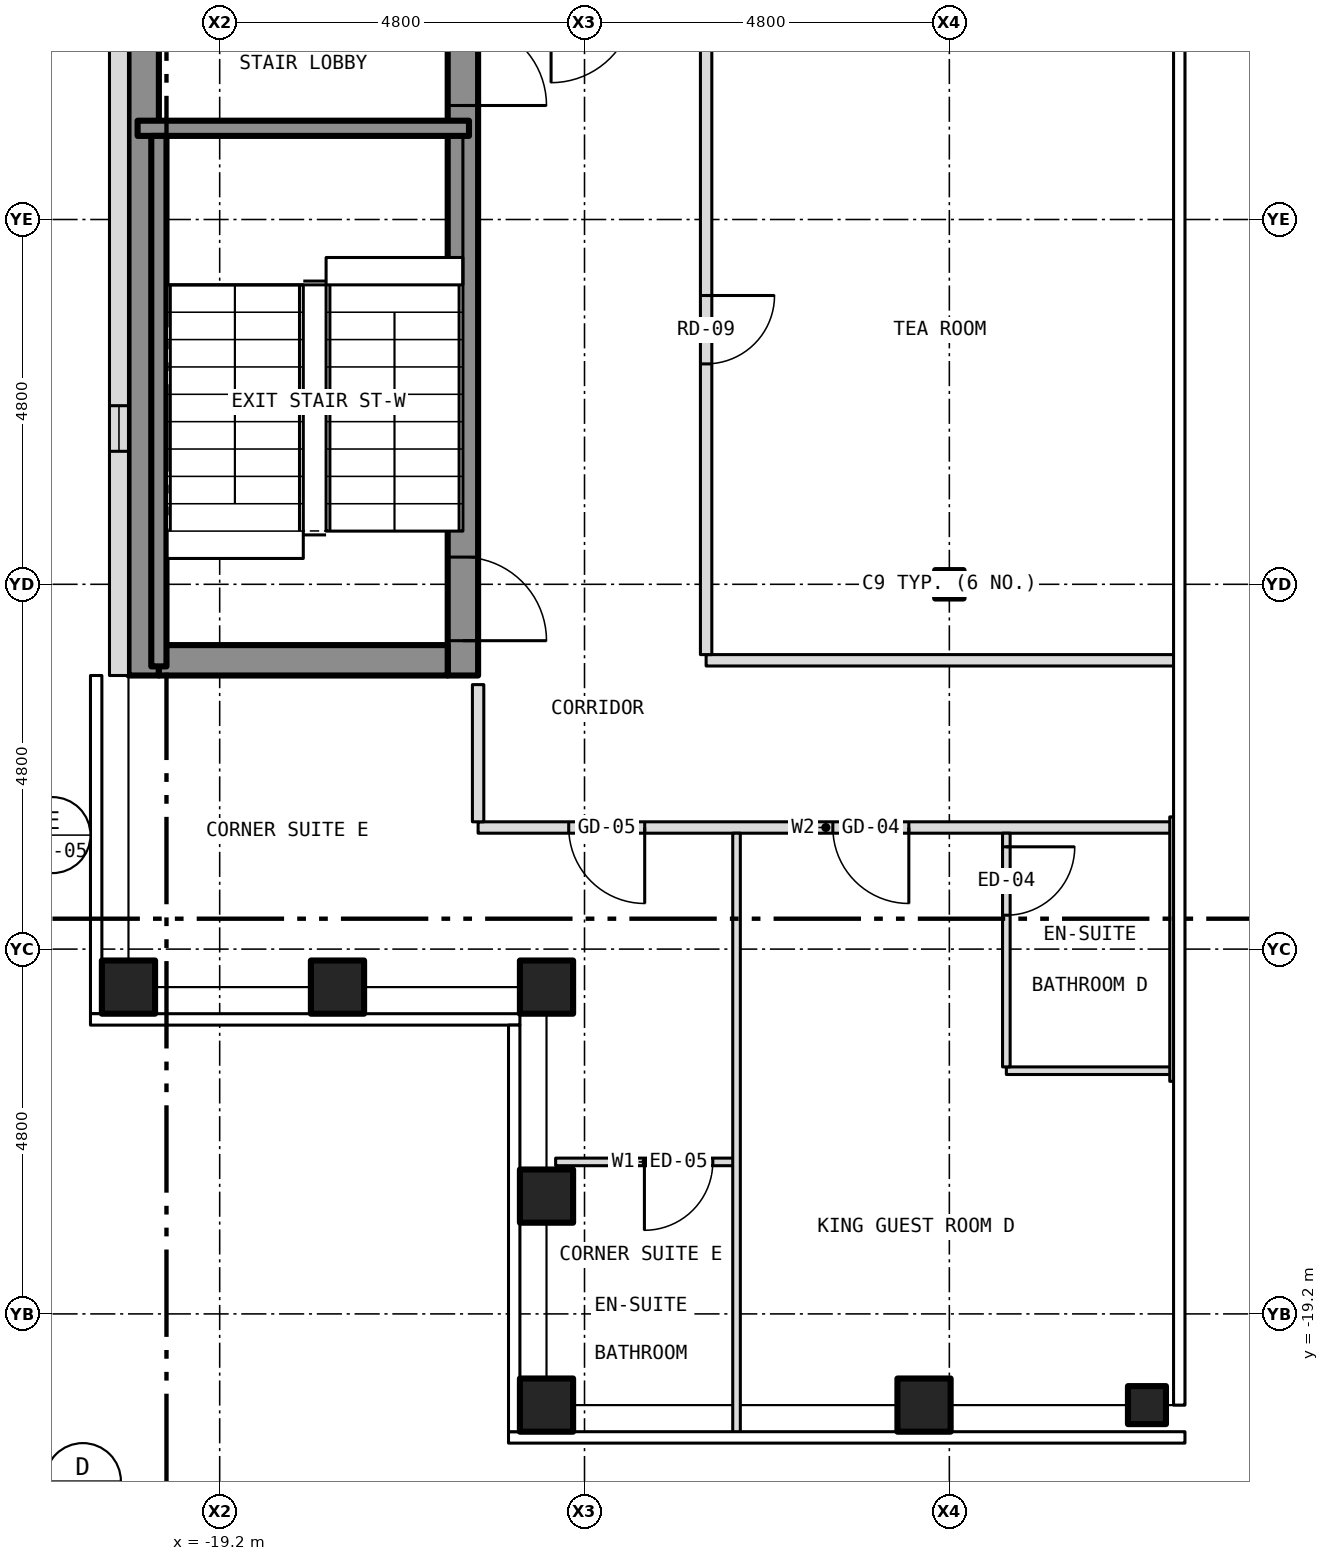
"""IFC4 building model, lengths in metres.
Left out: names, types, materials, properties, quantities, classifications, styles, units other than length and angle.
Written with IfcOpenShell. Run it as: python <this file> out.ifc"""

import sys

from ifc_helpers import new_model, si_unit, direction, frame, frame_2d, origin, origin_2d, place, context, subcontext, project, spatial, rectangle, hollow_rectangle, i_section, extrude, element, fill, save


model = new_model("IFC4")
c1 = context("Model", 3, precision=1e-05, world=origin(), true_north=direction((0.0, 1.0)))
c2 = subcontext(c1, "Body", "Model", "MODEL_VIEW")
j1 = project(units=[si_unit("LENGTHUNIT", "METRE"), si_unit("PLANEANGLEUNIT", "RADIAN")], contexts=[c1])
p1 = place(None, origin())
s1 = spatial("IfcSite", under=j1, at=p1, CompositionType="ELEMENT")
p2 = place(p1, origin())
s2 = spatial("IfcBuilding", under=s1, at=p2, CompositionType="ELEMENT")
p3 = place(p2, frame((0.0, 0.0, 222.5)))
s3 = spatial("IfcBuildingStorey", under=s2, at=p3, CompositionType="ELEMENT", Elevation=222.5)
for number, where, z_axis, x_axis in (
    (1, (-14.9, -20.4, -0.15), (0.0, 0.0, 1.0), (1.0, 0.0, 0.0)),
    (2, (-9.933, -20.4, -0.15), (0.0, 0.0, 1.0), (1.0, 0.0, 0.0)),
    (3, (-20.4, -14.9, -0.15), (0.0, 0.0, 1.0), (1.0, 0.0, 0.0)),
    (4, (-14.9, -14.9, -0.15), (0.0, 0.0, 1.0), (1.0, 0.0, 0.0)),
    (5, (-14.9, -17.65, -0.15), (0.0, 0.0, 1.0), (1.0, 0.0, 0.0)),
    (6, (-17.65, -14.9, -0.15), (0.0, 0.0, 1.0), (1.0, 0.0, 0.0)),
):
    element("IfcColumn", number, at=place(p3, frame(where, z_axis=z_axis, x_axis=x_axis)), inside=s3, PredefinedType="COLUMN", context=c2, shape_type="SweptSolid", body=[
        extrude(hollow_rectangle(XDim=0.7, YDim=0.7, WallThickness=0.04, at=origin_2d()), origin(), (0.0, 0.0, 1.0), 3.5),
    ])
p4 = place(p3, frame((-7.0, -20.4, -0.15), z_axis=(0.0, 0.0, 1.0), x_axis=(1.0, 0.0, 0.0)))
e7 = element("IfcColumn", 7, at=p4, inside=s3, PredefinedType="COLUMN", context=c2, shape_type="SweptSolid", body=[
    extrude(hollow_rectangle(XDim=0.5, YDim=0.5, WallThickness=0.03, at=origin_2d()), origin(), (0.0, 0.0, 1.0), 3.5),
])
p5 = place(p3, frame((-9.6, -9.6, -0.15), z_axis=(0.0, 0.0, 1.0), x_axis=(1.0, 0.0, 0.0)))
e8 = element("IfcColumn", 8, at=p5, inside=s3, PredefinedType="COLUMN", context=c2, shape_type="SweptSolid", body=[
    extrude(i_section(OverallWidth=0.373, OverallDepth=0.373, WebThickness=0.016, FlangeThickness=0.026, at=origin_2d()), origin(), (0.0, 0.0, 1.0), 3.5),
])
p6 = place(p3, frame((-16.0, -10.8, 0.0), z_axis=(0.0, 0.0, 1.0), x_axis=(0.0, 1.0, 0.0)))
e9 = element("IfcWall", 9, at=p6, inside=s3, PredefinedType="SHEAR", context=c2, shape_type="SweptSolid", body=[
    extrude(rectangle(XDim=21.6, YDim=0.4, at=frame_2d((10.8, 0.0))), origin(), (0.0, 0.0, 1.0), 3.25),
])
p7 = place(p6, frame((9.4, 0.0, 0.0)))
e10 = element("IfcOpeningElement", 10, at=p7, cuts=e9, PredefinedType="OPENING", context=c2, shape_type="SweptSolid", body=[
    extrude(rectangle(XDim=1.1, YDim=2.1, at=frame_2d((0.55, 1.05))), frame((0.0, 0.212, 0.0), z_axis=(0.0, -1.0, 0.0), x_axis=(1.0, 0.0, 0.0)), (0.0, 0.0, 1.0), 0.424),
])
p8 = place(p6, frame((11.5, 0.0, 0.0)))
e11 = element("IfcOpeningElement", 11, at=p8, cuts=e9, PredefinedType="OPENING", context=c2, shape_type="SweptSolid", body=[
    extrude(rectangle(XDim=1.1, YDim=2.1, at=frame_2d((0.55, 1.05))), frame((0.0, 0.212, 0.0), z_axis=(0.0, -1.0, 0.0), x_axis=(1.0, 0.0, 0.0)), (0.0, 0.0, 1.0), 0.424),
])
p9 = place(p6, frame((13.6, 0.0, 0.0)))
e12 = element("IfcOpeningElement", 12, at=p9, cuts=e9, PredefinedType="OPENING", context=c2, shape_type="SweptSolid", body=[
    extrude(rectangle(XDim=1.1, YDim=2.1, at=frame_2d((0.55, 1.05))), frame((0.0, 0.212, 0.0), z_axis=(0.0, -1.0, 0.0), x_axis=(1.0, 0.0, 0.0)), (0.0, 0.0, 1.0), 0.424),
])
p10 = place(p6, frame((15.7, 0.0, 0.0)))
e13 = element("IfcOpeningElement", 13, at=p10, cuts=e9, PredefinedType="OPENING", context=c2, shape_type="SweptSolid", body=[
    extrude(rectangle(XDim=1.1, YDim=2.1, at=frame_2d((0.55, 1.05))), frame((0.0, 0.212, 0.0), z_axis=(0.0, -1.0, 0.0), x_axis=(1.0, 0.0, 0.0)), (0.0, 0.0, 1.0), 0.424),
])
p11 = place(p6, frame((17.8, 0.0, 0.0)))
e14 = element("IfcOpeningElement", 14, at=p11, cuts=e9, PredefinedType="OPENING", context=c2, shape_type="SweptSolid", body=[
    extrude(rectangle(XDim=1.1, YDim=2.1, at=frame_2d((0.55, 1.05))), frame((0.0, 0.212, 0.0), z_axis=(0.0, -1.0, 0.0), x_axis=(1.0, 0.0, 0.0)), (0.0, 0.0, 1.0), 0.424),
])
p12 = place(p6, frame((0.458, 0.0, 0.0)))
e15 = element("IfcOpeningElement", 15, at=p12, cuts=e9, PredefinedType="OPENING", context=c2, shape_type="SweptSolid", body=[
    extrude(rectangle(XDim=1.1, YDim=2.1, at=frame_2d((0.55, 1.05))), frame((0.0, 0.212, 0.0), z_axis=(0.0, -1.0, 0.0), x_axis=(1.0, 0.0, 0.0)), (0.0, 0.0, 1.0), 0.424),
])
p13 = place(p6, frame((7.5, 0.0, 0.0)))
e16 = element("IfcOpeningElement", 16, at=p13, cuts=e9, PredefinedType="OPENING", context=c2, shape_type="SweptSolid", body=[
    extrude(rectangle(XDim=1.1, YDim=2.1, at=frame_2d((0.55, 1.05))), frame((0.0, 0.212, 0.0), z_axis=(0.0, -1.0, 0.0), x_axis=(1.0, 0.0, 0.0)), (0.0, 0.0, 1.0), 0.424),
])
p14 = place(p6, frame((20.0, 0.0, 0.0)))
e17 = element("IfcOpeningElement", 17, at=p14, cuts=e9, PredefinedType="OPENING", context=c2, shape_type="SweptSolid", body=[
    extrude(rectangle(XDim=0.9, YDim=2.1, at=frame_2d((0.45, 1.05))), frame((0.0, 0.212, 0.0), z_axis=(0.0, -1.0, 0.0), x_axis=(1.0, 0.0, 0.0)), (0.0, 0.0, 1.0), 0.424),
])
p15 = place(p3, frame((-20.2, -10.8, 0.0), z_axis=(0.0, 0.0, 1.0), x_axis=(0.0, 1.0, 0.0)))
e18 = element("IfcWall", 18, at=p15, inside=s3, PredefinedType="SHEAR", context=c2, shape_type="SweptSolid", body=[
    extrude(rectangle(XDim=21.6, YDim=0.4, at=frame_2d((10.8, 0.0))), origin(), (0.0, 0.0, 1.0), 3.25),
])
p16 = place(p3, frame((-20.0, -10.6, 0.0), z_axis=(0.0, 0.0, 1.0), x_axis=(1.0, 0.0, 0.0)))
e19 = element("IfcWall", 19, at=p16, inside=s3, PredefinedType="SHEAR", context=c2, shape_type="SweptSolid", body=[
    extrude(rectangle(XDim=3.8, YDim=0.4, at=frame_2d((1.9, 0.0))), origin(), (0.0, 0.0, 1.0), 3.25),
])
p17 = place(p3, frame((-20.525, 10.8, 0.0), z_axis=(0.0, 0.0, 1.0), x_axis=(0.0, -1.0, 0.0)))
e20 = element("IfcWall", 20, at=p17, inside=s3, PredefinedType="SOLIDWALL", context=c2, shape_type="SweptSolid", body=[
    extrude(rectangle(XDim=21.6, YDim=0.25, at=frame_2d((10.8, 0.0))), origin(), (0.0, 0.0, 1.0), 3.5),
])
p18 = place(p17, frame((18.05, 0.0, 1.0)))
e21 = element("IfcOpeningElement", 21, at=p18, cuts=e20, PredefinedType="OPENING", context=c2, shape_type="SweptSolid", body=[
    extrude(rectangle(XDim=0.6, YDim=1.5, at=frame_2d((0.3, 0.75))), frame((0.0, 0.137, 0.0), z_axis=(0.0, -1.0, 0.0), x_axis=(1.0, 0.0, 0.0)), (0.0, 0.0, 1.0), 0.274),
])
p19 = place(p3, frame((-14.78, -17.2, 0.0), z_axis=(0.0, 0.0, 1.0), x_axis=(1.0, 0.0, 0.0)))
e22 = element("IfcWall", 22, at=p19, inside=s3, PredefinedType="PARTITIONING", context=c2, shape_type="SweptSolid", body=[
    extrude(rectangle(XDim=2.38, YDim=0.1, at=frame_2d((1.19, 0.0))), origin(), (0.0, 0.0, 1.0), 3.35),
])
p20 = place(p19, frame((1.168, 0.0, 0.0)))
e23 = element("IfcOpeningElement", 23, at=p20, cuts=e22, PredefinedType="OPENING", context=c2, shape_type="SweptSolid", body=[
    extrude(rectangle(XDim=0.9, YDim=2.1, at=frame_2d((0.45, 1.05))), frame((0.0, 0.062, 0.0), z_axis=(0.0, -1.0, 0.0), x_axis=(1.0, 0.0, 0.0)), (0.0, 0.0, 1.0), 0.124),
])
p21 = place(p3, frame((-8.85, -16.0, 0.0), z_axis=(0.0, 0.0, 1.0), x_axis=(1.0, 0.0, 0.0)))
e24 = element("IfcWall", 24, at=p21, inside=s3, PredefinedType="PARTITIONING", context=c2, shape_type="SweptSolid", body=[
    extrude(rectangle(XDim=2.2, YDim=0.1, at=frame_2d((1.1, 0.0))), origin(), (0.0, 0.0, 1.0), 3.35),
])
p22 = place(p3, frame((-15.8, -12.8, 0.0), z_axis=(0.0, 0.0, 1.0), x_axis=(1.0, 0.0, 0.0)))
e25 = element("IfcWall", 25, at=p22, inside=s3, PredefinedType="PARTITIONING", context=c2, shape_type="SweptSolid", body=[
    extrude(rectangle(XDim=9.15, YDim=0.15, at=frame_2d((4.575, 0.0))), origin(), (0.0, 0.0, 1.0), 3.35),
])
p23 = place(p22, frame((4.667, 0.0, 0.0)))
e26 = element("IfcOpeningElement", 26, at=p23, cuts=e25, PredefinedType="OPENING", context=c2, shape_type="SweptSolid", body=[
    extrude(rectangle(XDim=1.0, YDim=2.1, at=frame_2d((0.5, 1.05))), frame((0.0, 0.087, 0.0), z_axis=(0.0, -1.0, 0.0), x_axis=(1.0, 0.0, 0.0)), (0.0, 0.0, 1.0), 0.174),
])
p24 = place(p22, frame((1.192, 0.0, 0.0)))
e27 = element("IfcOpeningElement", 27, at=p24, cuts=e25, PredefinedType="OPENING", context=c2, shape_type="SweptSolid", body=[
    extrude(rectangle(XDim=1.0, YDim=2.1, at=frame_2d((0.5, 1.05))), frame((0.0, 0.087, 0.0), z_axis=(0.0, -1.0, 0.0), x_axis=(1.0, 0.0, 0.0)), (0.0, 0.0, 1.0), 0.174),
])
p25 = place(p3, frame((-12.8, -10.6, 0.0), z_axis=(0.0, 0.0, 1.0), x_axis=(1.0, 0.0, 0.0)))
e28 = element("IfcWall", 28, at=p25, inside=s3, PredefinedType="PARTITIONING", context=c2, shape_type="SweptSolid", body=[
    extrude(rectangle(XDim=6.18, YDim=0.15, at=frame_2d((3.09, 0.0))), origin(), (0.0, 0.0, 1.0), 3.35),
])
p26 = place(p3, frame((-20.28, -3.6, 0.0), z_axis=(0.0, 0.0, 1.0), x_axis=(1.0, 0.0, 0.0)))
e29 = element("IfcWall", 29, at=p26, inside=s3, PredefinedType="SHEAR", context=c2, shape_type="SweptSolid", body=[
    extrude(rectangle(XDim=4.36, YDim=0.2, at=frame_2d((2.18, 0.0))), origin(), (0.0, 0.0, 1.0), 3.25),
])
p27 = place(p3, frame((-20.0, -10.68, 0.0), z_axis=(0.0, 0.0, 1.0), x_axis=(0.0, 1.0, 0.0)))
e30 = element("IfcWall", 30, at=p27, inside=s3, PredefinedType="SHEAR", context=c2, shape_type="SweptSolid", body=[
    extrude(rectangle(XDim=6.98, YDim=0.2, at=frame_2d((3.49, 0.0))), origin(), (0.0, 0.0, 1.0), 3.25),
])
p28 = place(p3, frame((-15.8, -12.725, 0.0), z_axis=(0.0, 0.0, 1.0), x_axis=(0.0, 1.0, 0.0)))
e31 = element("IfcWall", 31, at=p28, inside=s3, PredefinedType="PARTITIONING", context=c2, shape_type="SweptSolid", body=[
    extrude(rectangle(XDim=1.805, YDim=0.15, at=frame_2d((0.903, 0.0))), origin(), (0.0, 0.0, 1.0), 3.35),
])
p29 = place(p3, frame((-12.8, -10.525, 0.0), z_axis=(0.0, 0.0, 1.0), x_axis=(0.0, 1.0, 0.0)))
e32 = element("IfcWall", 32, at=p29, inside=s3, PredefinedType="PARTITIONING", context=c2, shape_type="SweptSolid", body=[
    extrude(rectangle(XDim=8.525, YDim=0.15, at=frame_2d((4.262, 0.0))), origin(), (0.0, 0.0, 1.0), 3.35),
])
p30 = place(p29, frame((3.825, 0.0, 0.0)))
e33 = element("IfcOpeningElement", 33, at=p30, cuts=e32, PredefinedType="OPENING", context=c2, shape_type="SweptSolid", body=[
    extrude(rectangle(XDim=0.9, YDim=2.1, at=frame_2d((0.45, 1.05))), frame((0.0, 0.087, 0.0), z_axis=(0.0, -1.0, 0.0), x_axis=(1.0, 0.0, 0.0)), (0.0, 0.0, 1.0), 0.174),
])
p31 = place(p3, frame((-12.4, -20.78, 0.0), z_axis=(0.0, 0.0, 1.0), x_axis=(0.0, 1.0, 0.0)))
e34 = element("IfcWall", 34, at=p31, inside=s3, PredefinedType="PARTITIONING", context=c2, shape_type="SweptSolid", body=[
    extrude(rectangle(XDim=7.905, YDim=0.1, at=frame_2d((3.953, 0.0))), origin(), (0.0, 0.0, 1.0), 3.35),
])
p32 = place(p3, frame((-8.85, -15.95, 0.0), z_axis=(0.0, 0.0, 1.0), x_axis=(0.0, 1.0, 0.0)))
e35 = element("IfcWall", 35, at=p32, inside=s3, PredefinedType="PARTITIONING", context=c2, shape_type="SweptSolid", body=[
    extrude(rectangle(XDim=3.075, YDim=0.1, at=frame_2d((1.538, 0.0))), origin(), (0.0, 0.0, 1.0), 3.35),
])
p33 = place(p32, frame((1.996, 0.0, 0.0)))
e36 = element("IfcOpeningElement", 36, at=p33, cuts=e35, PredefinedType="OPENING", context=c2, shape_type="SweptSolid", body=[
    extrude(rectangle(XDim=0.9, YDim=2.1, at=frame_2d((0.45, 1.05))), frame((0.0, 0.062, 0.0), z_axis=(0.0, -1.0, 0.0), x_axis=(1.0, 0.0, 0.0)), (0.0, 0.0, 1.0), 0.124),
])
p34 = place(p3, frame((-6.65, -16.14, 0.0), z_axis=(0.0, 0.0, 1.0), x_axis=(0.0, 1.0, 0.0)))
e37 = element("IfcWall", 37, at=p34, inside=s3, PredefinedType="PARTITIONING", context=c2, shape_type="SweptSolid", body=[
    extrude(rectangle(XDim=3.48, YDim=0.1, at=frame_2d((1.74, 0.0))), origin(), (0.0, 0.0, 1.0), 3.35),
])
p35 = place(p18, origin())
e38 = element("IfcWindow", 38, at=p35, inside=s3, PartitioningType="SINGLE_PANEL", PredefinedType="WINDOW", context=c2, shape_type="SweptSolid", body=[
    extrude(rectangle(XDim=0.6, YDim=1.5, at=frame_2d((0.3, 0.75))), frame((0.0, -0.035, 0.0), z_axis=(0.0, -1.0, 0.0), x_axis=(1.0, 0.0, 0.0)), (0.0, 0.0, 1.0), 0.06),
])
fill(e21, e38)
p36 = place(p12, origin())
e39 = element("IfcDoor", 39, at=p36, inside=s3, OperationType="SINGLE_SWING_LEFT", PredefinedType="DOOR", context=c2, shape_type="SweptSolid", body=[
    extrude(rectangle(XDim=1.1, YDim=2.1, at=frame_2d((0.55, 1.05))), frame((0.0, 0.025, 0.0), z_axis=(0.0, -1.0, 0.0), x_axis=(1.0, 0.0, 0.0)), (0.0, 0.0, 1.0), 0.05),
])
fill(e15, e39)
p37 = place(p13, origin())
e40 = element("IfcDoor", 40, at=p37, inside=s3, OperationType="SINGLE_SWING_LEFT", PredefinedType="DOOR", context=c2, shape_type="SweptSolid", body=[
    extrude(rectangle(XDim=1.1, YDim=2.1, at=frame_2d((0.55, 1.05))), frame((0.0, 0.025, 0.0), z_axis=(0.0, -1.0, 0.0), x_axis=(1.0, 0.0, 0.0)), (0.0, 0.0, 1.0), 0.05),
])
fill(e16, e40)
p38 = place(p23, origin())
e41 = element("IfcDoor", 41, at=p38, inside=s3, OperationType="SINGLE_SWING_RIGHT", PredefinedType="DOOR", context=c2, shape_type="SweptSolid", body=[
    extrude(rectangle(XDim=1.0, YDim=2.1, at=frame_2d((0.5, 1.05))), frame((0.0, 0.025, 0.0), z_axis=(0.0, -1.0, 0.0), x_axis=(1.0, 0.0, 0.0)), (0.0, 0.0, 1.0), 0.05),
])
fill(e26, e41)
p39 = place(p33, origin())
e42 = element("IfcDoor", 42, at=p39, inside=s3, OperationType="SINGLE_SWING_RIGHT", PredefinedType="DOOR", context=c2, shape_type="SweptSolid", body=[
    extrude(rectangle(XDim=0.9, YDim=2.1, at=frame_2d((0.45, 1.05))), frame((0.0, 0.025, 0.0), z_axis=(0.0, -1.0, 0.0), x_axis=(1.0, 0.0, 0.0)), (0.0, 0.0, 1.0), 0.05),
])
fill(e36, e42)
p40 = place(p20, origin())
e43 = element("IfcDoor", 43, at=p40, inside=s3, OperationType="SINGLE_SWING_LEFT", PredefinedType="DOOR", context=c2, shape_type="SweptSolid", body=[
    extrude(rectangle(XDim=0.9, YDim=2.1, at=frame_2d((0.45, 1.05))), frame((0.0, 0.025, 0.0), z_axis=(0.0, -1.0, 0.0), x_axis=(1.0, 0.0, 0.0)), (0.0, 0.0, 1.0), 0.05),
])
fill(e23, e43)
p41 = place(p24, origin())
e44 = element("IfcDoor", 44, at=p41, inside=s3, OperationType="SINGLE_SWING_RIGHT", PredefinedType="DOOR", context=c2, shape_type="SweptSolid", body=[
    extrude(rectangle(XDim=1.0, YDim=2.1, at=frame_2d((0.5, 1.05))), frame((0.0, 0.025, 0.0), z_axis=(0.0, -1.0, 0.0), x_axis=(1.0, 0.0, 0.0)), (0.0, 0.0, 1.0), 0.05),
])
fill(e27, e44)
p42 = place(p30, origin())
e45 = element("IfcDoor", 45, at=p42, inside=s3, OperationType="SINGLE_SWING_RIGHT", PredefinedType="DOOR", context=c2, shape_type="SweptSolid", body=[
    extrude(rectangle(XDim=0.9, YDim=2.1, at=frame_2d((0.45, 1.05))), frame((0.0, 0.025, 0.0), z_axis=(0.0, -1.0, 0.0), x_axis=(1.0, 0.0, 0.0)), (0.0, 0.0, 1.0), 0.05),
])
fill(e33, e45)
save(model, sys.argv[1])
